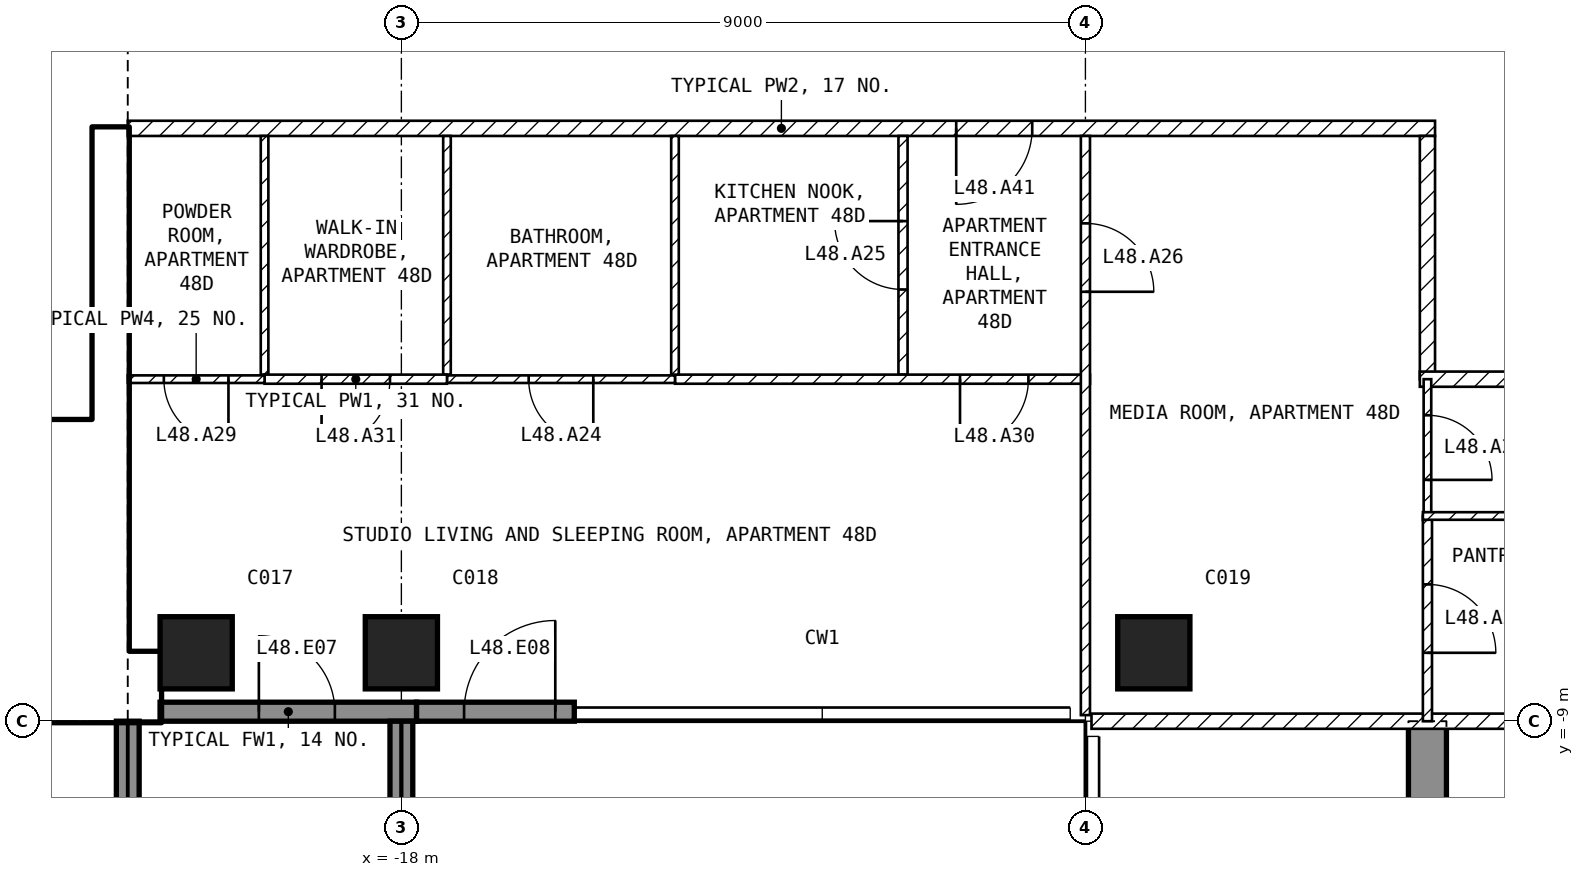
"""IFC4 building model, lengths in metres.
Left out: names, types, materials, properties, quantities, classifications, styles, units other than length and angle.
Written with IfcOpenShell. Run it as: python <this file> out.ifc"""

import sys

from ifc_helpers import new_model, si_unit, direction, frame, frame_2d, origin, origin_2d, place, context, subcontext, project, spatial, polyline, rectangle, outline, extrude, element, fill, save


model = new_model("IFC4")
c1 = context("Model", 3, precision=1e-05, world=origin(), true_north=direction((0.0, 1.0)))
c2 = subcontext(c1, "Body", "Model", "MODEL_VIEW")
j1 = project(units=[si_unit("LENGTHUNIT", "METRE"), si_unit("PLANEANGLEUNIT", "RADIAN")], contexts=[c1])
p1 = place(None, origin())
s1 = spatial("IfcSite", under=j1, at=p1, CompositionType="ELEMENT")
p2 = place(p1, origin())
s2 = spatial("IfcBuilding", under=s1, at=p2, CompositionType="ELEMENT")
p3 = place(p2, frame((0.0, 0.0, 194.6)))
s3 = spatial("IfcBuildingStorey", under=s2, at=p3, CompositionType="ELEMENT", Elevation=194.6)
for number, where, z_axis, x_axis in (
    (1, (-20.7, -8.1, -0.25), (0.0, 0.0, 1.0), (1.0, 0.0, 0.0)),
    (2, (-18.0, -8.1, -0.25), (0.0, 0.0, 1.0), (1.0, 0.0, 0.0)),
    (3, (-8.1, -8.1, -0.25), (0.0, 0.0, 1.0), (1.0, 0.0, 0.0)),
):
    element("IfcColumn", number, at=place(p3, frame(where, z_axis=z_axis, x_axis=x_axis)), inside=s3, PredefinedType="COLUMN", context=c2, shape_type="SweptSolid", body=[
        extrude(rectangle(XDim=0.95, YDim=0.95, at=origin_2d()), origin(), (0.0, 0.0, 1.0), 3.5),
    ])
p4 = place(p3, frame((-4.75, -20.225, -0.25), z_axis=(1.0, 0.0, 0.0), x_axis=(0.0, 1.0, 0.0)))
e4 = element("IfcWall", 4, at=p4, inside=s3, PredefinedType="SHEAR", context=c2, shape_type="SweptSolid", body=[
    extrude(outline(polyline([(0.0, 0.0), (6.725, 0.0), (6.725, 2.65), (9.125, 2.65), (9.125, 0.0), (11.225, 0.0), (11.225, 3.5), (0.0, 3.5), (0.0, 0.0)])), origin(), (0.0, 0.0, 1.0), 0.5),
])
p5 = place(p3, frame((-21.175, -8.875, 0.0), z_axis=(0.0, 0.0, 1.0), x_axis=(1.0, 0.0, 0.0)))
e5 = element("IfcWall", 5, at=p5, inside=s3, PredefinedType="SOLIDWALL", context=c2, shape_type="SweptSolid", body=[
    extrude(rectangle(XDim=3.375, YDim=0.25, at=frame_2d((1.688, 0.0))), origin(), (0.0, 0.0, 1.0), 3.25),
])
p6 = place(p5, frame((1.3, 0.0, 0.0)))
e6 = element("IfcOpeningElement", 6, at=p6, cuts=e5, PredefinedType="OPENING", context=c2, shape_type="SweptSolid", body=[
    extrude(rectangle(XDim=1.0, YDim=2.4, at=frame_2d((0.5, 1.2))), frame((0.0, 0.135, 0.0), z_axis=(0.0, -1.0, 0.0), x_axis=(1.0, 0.0, 0.0)), (0.0, 0.0, 1.0), 0.27),
])
p7 = place(p3, frame((-17.8, -8.875, 0.0), z_axis=(0.0, 0.0, 1.0), x_axis=(1.0, 0.0, 0.0)))
e7 = element("IfcWall", 7, at=p7, inside=s3, PredefinedType="SOLIDWALL", context=c2, shape_type="SweptSolid", body=[
    extrude(rectangle(XDim=2.075, YDim=0.25, at=frame_2d((1.038, 0.0))), origin(), (0.0, 0.0, 1.0), 3.25),
])
p8 = place(p7, frame((0.625, 0.0, 0.0)))
e8 = element("IfcOpeningElement", 8, at=p8, cuts=e7, PredefinedType="OPENING", context=c2, shape_type="SweptSolid", body=[
    extrude(rectangle(XDim=1.2, YDim=2.4, at=frame_2d((0.6, 1.2))), frame((0.0, 0.135, 0.0), z_axis=(0.0, -1.0, 0.0), x_axis=(1.0, 0.0, 0.0)), (0.0, 0.0, 1.0), 0.27),
])
for number, where, z_axis, x_axis in (
    (9, (-21.6, -9.0, 0.0), (0.0, 0.0, 1.0), (0.0, -1.0, 0.0)),
    (10, (-18.0, -9.0, 0.0), (0.0, 0.0, 1.0), (0.0, -1.0, 0.0)),
):
    element("IfcWall", number, at=place(p3, frame(where, z_axis=z_axis, x_axis=x_axis)), inside=s3, PredefinedType="SOLIDWALL", context=c2, shape_type="SweptSolid", body=[
        extrude(rectangle(XDim=2.7, YDim=0.3, at=frame_2d((1.35, 0.0))), origin(), (0.0, 0.0, 1.0), 3.25),
    ])
p9 = place(p3, frame((-30.2, -8.55, 0.0), z_axis=(0.0, 0.0, 1.0), x_axis=(1.0, 0.0, 0.0)))
e11 = element("IfcWall", 11, at=p9, inside=s3, PredefinedType="SHEAR", context=c2, shape_type="SweptSolid", body=[
    extrude(rectangle(XDim=9.025, YDim=0.9, at=frame_2d((4.512, 0.0))), origin(), (0.0, 0.0, 1.0), 3.25),
])
p10 = place(p3, frame((-21.825, -8.1, 0.0), z_axis=(0.0, 0.0, 1.0), x_axis=(0.0, 1.0, 0.0)))
e12 = element("IfcWall", 12, at=p10, inside=s3, PredefinedType="SHEAR", context=c2, shape_type="SweptSolid", body=[
    extrude(rectangle(XDim=6.9, YDim=0.45, at=frame_2d((3.45, 0.0))), origin(), (0.0, 0.0, 1.0), 3.25),
])
p11 = place(p3, frame((-28.35, -5.15, 0.0), z_axis=(0.0, 0.0, 1.0), x_axis=(1.0, 0.0, 0.0)))
e13 = element("IfcWall", 13, at=p11, inside=s3, PredefinedType="SOLIDWALL", context=c2, shape_type="SweptSolid", body=[
    extrude(rectangle(XDim=6.3, YDim=0.2, at=frame_2d((3.15, 0.0))), origin(), (0.0, 0.0, 1.0), 3.25),
])
p12 = place(p11, frame((5.1, 0.0, 0.0)))
e14 = element("IfcOpeningElement", 14, at=p12, cuts=e13, PredefinedType="OPENING", context=c2, shape_type="SweptSolid", body=[
    extrude(rectangle(XDim=1.0, YDim=2.1, at=frame_2d((0.5, 1.05))), frame((0.0, 0.11, 0.0), z_axis=(0.0, -1.0, 0.0), x_axis=(1.0, 0.0, 0.0)), (0.0, 0.0, 1.0), 0.22),
])
p13 = place(p3, frame((-4.4, -1.2, 0.0), z_axis=(0.0, 0.0, 1.0), x_axis=(-1.0, 0.0, 0.0)))
e15 = element("IfcWall", 15, at=p13, inside=s3, PredefinedType="PARTITIONING", context=c2, shape_type="SweptSolid", body=[
    extrude(rectangle(XDim=17.2, YDim=0.2, at=frame_2d((8.6, 0.0))), origin(), (0.0, 0.0, 1.0), 3.25),
])
p14 = place(p13, frame((5.3, 0.0, 0.0)))
e16 = element("IfcOpeningElement", 16, at=p14, cuts=e15, PredefinedType="OPENING", context=c2, shape_type="SweptSolid", body=[
    extrude(rectangle(XDim=1.0, YDim=2.1, at=frame_2d((0.5, 1.05))), frame((0.0, 0.11, 0.0), z_axis=(0.0, -1.0, 0.0), x_axis=(1.0, 0.0, 0.0)), (0.0, 0.0, 1.0), 0.22),
])
p15 = place(p3, frame((-4.5, -4.5, 0.0), z_axis=(0.0, 0.0, 1.0), x_axis=(0.0, 1.0, 0.0)))
e17 = element("IfcWall", 17, at=p15, inside=s3, PredefinedType="PARTITIONING", context=c2, shape_type="SweptSolid", body=[
    extrude(rectangle(XDim=3.2, YDim=0.2, at=frame_2d((1.6, 0.0))), origin(), (0.0, 0.0, 1.0), 3.25),
])
p16 = place(p3, frame((-1.1, -4.5, 0.0), z_axis=(0.0, 0.0, 1.0), x_axis=(-1.0, 0.0, 0.0)))
e18 = element("IfcWall", 18, at=p16, inside=s3, PredefinedType="PARTITIONING", context=c2, shape_type="SweptSolid", body=[
    extrude(rectangle(XDim=3.5, YDim=0.2, at=frame_2d((1.75, 0.0))), origin(), (0.0, 0.0, 1.0), 3.25),
])
p17 = place(p3, frame((8.92, -9.0, 0.0), z_axis=(0.0, 0.0, 1.0), x_axis=(-1.0, 0.0, 0.0)))
e19 = element("IfcWall", 19, at=p17, inside=s3, PredefinedType="PARTITIONING", context=c2, shape_type="SweptSolid", body=[
    extrude(rectangle(XDim=17.84, YDim=0.2, at=frame_2d((8.92, 0.0))), origin(), (0.0, 0.0, 1.0), 3.25),
])
p18 = place(p17, frame((8.42, 0.0, 0.0)))
e20 = element("IfcOpeningElement", 20, at=p18, cuts=e19, PredefinedType="OPENING", context=c2, shape_type="SweptSolid", body=[
    extrude(rectangle(XDim=1.0, YDim=2.1, at=frame_2d((0.5, 1.05))), frame((0.0, 0.11, 0.0), z_axis=(0.0, -1.0, 0.0), x_axis=(1.0, 0.0, 0.0)), (0.0, 0.0, 1.0), 0.22),
])
p19 = place(p3, frame((-11.4, -4.44, 0.0), z_axis=(0.0, 0.0, 1.0), x_axis=(0.0, 1.0, 0.0)))
e21 = element("IfcWall", 21, at=p19, inside=s3, PredefinedType="PARTITIONING", context=c2, shape_type="SweptSolid", body=[
    extrude(rectangle(XDim=3.14, YDim=0.12, at=frame_2d((1.57, 0.0))), origin(), (0.0, 0.0, 1.0), 3.25),
])
p20 = place(p19, frame((1.12, 0.0, 0.0)))
e22 = element("IfcOpeningElement", 22, at=p20, cuts=e21, PredefinedType="OPENING", context=c2, shape_type="SweptSolid", body=[
    extrude(rectangle(XDim=0.9, YDim=2.1, at=frame_2d((0.45, 1.05))), frame((0.0, 0.07, 0.0), z_axis=(0.0, -1.0, 0.0), x_axis=(1.0, 0.0, 0.0)), (0.0, 0.0, 1.0), 0.14),
])
p21 = place(p3, frame((-8.94, -4.5, 0.0), z_axis=(0.0, 0.0, 1.0), x_axis=(-1.0, 0.0, 0.0)))
e23 = element("IfcWall", 23, at=p21, inside=s3, PredefinedType="PARTITIONING", context=c2, shape_type="SweptSolid", body=[
    extrude(rectangle(XDim=5.46, YDim=0.12, at=frame_2d((2.73, 0.0))), origin(), (0.0, 0.0, 1.0), 3.25),
])
p22 = place(p21, frame((0.81, 0.0, 0.0)))
e24 = element("IfcOpeningElement", 24, at=p22, cuts=e23, PredefinedType="OPENING", context=c2, shape_type="SweptSolid", body=[
    extrude(rectangle(XDim=0.9, YDim=2.1, at=frame_2d((0.45, 1.05))), frame((0.0, 0.07, 0.0), z_axis=(0.0, -1.0, 0.0), x_axis=(1.0, 0.0, 0.0)), (0.0, 0.0, 1.0), 0.14),
])
p23 = place(p3, frame((-9.0, -1.3, 0.0), z_axis=(0.0, 0.0, 1.0), x_axis=(0.0, -1.0, 0.0)))
e25 = element("IfcWall", 25, at=p23, inside=s3, PredefinedType="PARTITIONING", context=c2, shape_type="SweptSolid", body=[
    extrude(rectangle(XDim=7.62, YDim=0.12, at=frame_2d((3.81, 0.0))), origin(), (0.0, 0.0, 1.0), 3.25),
])
p24 = place(p23, frame((1.15, 0.0, 0.0)))
e26 = element("IfcOpeningElement", 26, at=p24, cuts=e25, PredefinedType="OPENING", context=c2, shape_type="SweptSolid", body=[
    extrude(rectangle(XDim=0.9, YDim=2.1, at=frame_2d((0.45, 1.05))), frame((0.0, 0.07, 0.0), z_axis=(0.0, -1.0, 0.0), x_axis=(1.0, 0.0, 0.0)), (0.0, 0.0, 1.0), 0.14),
])
for number, where, z_axis, x_axis in (
    (27, (-14.4, -4.44, 0.0), (0.0, 0.0, 1.0), (0.0, 1.0, 0.0)),
    (28, (-17.4, -4.44, 0.0), (0.0, 0.0, 1.0), (0.0, 1.0, 0.0)),
):
    element("IfcWall", number, at=place(p3, frame(where, z_axis=z_axis, x_axis=x_axis)), inside=s3, PredefinedType="PARTITIONING", context=c2, shape_type="SweptSolid", body=[
        extrude(rectangle(XDim=3.14, YDim=0.1, at=frame_2d((1.57, 0.0))), origin(), (0.0, 0.0, 1.0), 3.25),
    ])
p25 = place(p3, frame((-14.4, -4.5, 0.0), z_axis=(0.0, 0.0, 1.0), x_axis=(-1.0, 0.0, 0.0)))
e29 = element("IfcWall", 29, at=p25, inside=s3, PredefinedType="PARTITIONING", context=c2, shape_type="SweptSolid", body=[
    extrude(rectangle(XDim=3.0, YDim=0.1, at=frame_2d((1.5, 0.0))), origin(), (0.0, 0.0, 1.0), 3.25),
])
p26 = place(p25, frame((1.075, 0.0, 0.0)))
e30 = element("IfcOpeningElement", 30, at=p26, cuts=e29, PredefinedType="OPENING", context=c2, shape_type="SweptSolid", body=[
    extrude(rectangle(XDim=0.85, YDim=2.1, at=frame_2d((0.425, 1.05))), frame((0.0, 0.06, 0.0), z_axis=(0.0, -1.0, 0.0), x_axis=(1.0, 0.0, 0.0)), (0.0, 0.0, 1.0), 0.12),
])
p27 = place(p3, frame((-19.8, -4.44, 0.0), z_axis=(0.0, 0.0, 1.0), x_axis=(0.0, 1.0, 0.0)))
e31 = element("IfcWall", 31, at=p27, inside=s3, PredefinedType="PARTITIONING", context=c2, shape_type="SweptSolid", body=[
    extrude(rectangle(XDim=3.14, YDim=0.1, at=frame_2d((1.57, 0.0))), origin(), (0.0, 0.0, 1.0), 3.25),
])
p28 = place(p3, frame((-17.4, -4.5, 0.0), z_axis=(0.0, 0.0, 1.0), x_axis=(-1.0, 0.0, 0.0)))
e32 = element("IfcWall", 32, at=p28, inside=s3, PredefinedType="PARTITIONING", context=c2, shape_type="SweptSolid", body=[
    extrude(rectangle(XDim=2.4, YDim=0.12, at=frame_2d((1.2, 0.0))), origin(), (0.0, 0.0, 1.0), 3.25),
])
p29 = place(p28, frame((0.75, 0.0, 0.0)))
e33 = element("IfcOpeningElement", 33, at=p29, cuts=e32, PredefinedType="OPENING", context=c2, shape_type="SweptSolid", body=[
    extrude(rectangle(XDim=0.9, YDim=2.1, at=frame_2d((0.45, 1.05))), frame((0.0, 0.07, 0.0), z_axis=(0.0, -1.0, 0.0), x_axis=(1.0, 0.0, 0.0)), (0.0, 0.0, 1.0), 0.14),
])
p30 = place(p3, frame((-19.8, -4.5, 0.0), z_axis=(0.0, 0.0, 1.0), x_axis=(-1.0, 0.0, 0.0)))
e34 = element("IfcWall", 34, at=p30, inside=s3, PredefinedType="PARTITIONING", context=c2, shape_type="SweptSolid", body=[
    extrude(rectangle(XDim=1.8, YDim=0.1, at=frame_2d((0.9, 0.0))), origin(), (0.0, 0.0, 1.0), 3.25),
])
p31 = place(p30, frame((0.475, 0.0, 0.0)))
e35 = element("IfcOpeningElement", 35, at=p31, cuts=e34, PredefinedType="OPENING", context=c2, shape_type="SweptSolid", body=[
    extrude(rectangle(XDim=0.85, YDim=2.1, at=frame_2d((0.425, 1.05))), frame((0.0, 0.06, 0.0), z_axis=(0.0, -1.0, 0.0), x_axis=(1.0, 0.0, 0.0)), (0.0, 0.0, 1.0), 0.12),
])
p32 = place(p3, frame((-4.5, -4.5, 0.0), z_axis=(0.0, 0.0, 1.0), x_axis=(0.0, -1.0, 0.0)))
e36 = element("IfcWall", 36, at=p32, inside=s3, PredefinedType="PARTITIONING", context=c2, shape_type="SweptSolid", body=[
    extrude(rectangle(XDim=1.8, YDim=0.1, at=frame_2d((0.9, 0.0))), origin(), (0.0, 0.0, 1.0), 3.25),
])
p33 = place(p32, frame((0.475, 0.0, 0.0)))
e37 = element("IfcOpeningElement", 37, at=p33, cuts=e36, PredefinedType="OPENING", context=c2, shape_type="SweptSolid", body=[
    extrude(rectangle(XDim=0.85, YDim=2.1, at=frame_2d((0.425, 1.05))), frame((0.0, 0.06, 0.0), z_axis=(0.0, -1.0, 0.0), x_axis=(1.0, 0.0, 0.0)), (0.0, 0.0, 1.0), 0.12),
])
p34 = place(p3, frame((-4.5, -6.3, 0.0), z_axis=(0.0, 0.0, 1.0), x_axis=(0.0, -1.0, 0.0)))
e38 = element("IfcWall", 38, at=p34, inside=s3, PredefinedType="PARTITIONING", context=c2, shape_type="SweptSolid", body=[
    extrude(rectangle(XDim=2.7, YDim=0.12, at=frame_2d((1.35, 0.0))), origin(), (0.0, 0.0, 1.0), 3.25),
])
p35 = place(p34, frame((0.9, 0.0, 0.0)))
e39 = element("IfcOpeningElement", 39, at=p35, cuts=e38, PredefinedType="OPENING", context=c2, shape_type="SweptSolid", body=[
    extrude(rectangle(XDim=0.9, YDim=2.1, at=frame_2d((0.45, 1.05))), frame((0.0, 0.07, 0.0), z_axis=(0.0, -1.0, 0.0), x_axis=(1.0, 0.0, 0.0)), (0.0, 0.0, 1.0), 0.14),
])
p36 = place(p3, frame((-1.1, -6.3, 0.0), z_axis=(0.0, 0.0, 1.0), x_axis=(-1.0, 0.0, 0.0)))
e40 = element("IfcWall", 40, at=p36, inside=s3, PredefinedType="PARTITIONING", context=c2, shape_type="SweptSolid", body=[
    extrude(rectangle(XDim=3.46, YDim=0.1, at=frame_2d((1.73, 0.0))), origin(), (0.0, 0.0, 1.0), 3.25),
])
p37 = place(p6, origin())
e41 = element("IfcDoor", 41, at=p37, inside=s3, OperationType="SINGLE_SWING_LEFT", PredefinedType="DOOR", context=c2, shape_type="SweptSolid", body=[
    extrude(rectangle(XDim=1.0, YDim=2.4, at=frame_2d((0.5, 1.2))), frame((0.0, 0.025, 0.0), z_axis=(0.0, -1.0, 0.0), x_axis=(1.0, 0.0, 0.0)), (0.0, 0.0, 1.0), 0.05),
])
fill(e6, e41)
p38 = place(p8, origin())
e42 = element("IfcDoor", 42, at=p38, inside=s3, OperationType="SINGLE_SWING_RIGHT", PredefinedType="DOOR", context=c2, shape_type="SweptSolid", body=[
    extrude(rectangle(XDim=1.2, YDim=2.4, at=frame_2d((0.6, 1.2))), frame((0.0, 0.025, 0.0), z_axis=(0.0, -1.0, 0.0), x_axis=(1.0, 0.0, 0.0)), (0.0, 0.0, 1.0), 0.05),
])
fill(e8, e42)
p39 = place(p12, origin())
e43 = element("IfcDoor", 43, at=p39, inside=s3, OperationType="SINGLE_SWING_LEFT", PredefinedType="DOOR", context=c2, shape_type="SweptSolid", body=[
    extrude(rectangle(XDim=1.0, YDim=2.1, at=frame_2d((0.5, 1.05))), frame((0.0, 0.025, 0.0), z_axis=(0.0, -1.0, 0.0), x_axis=(1.0, 0.0, 0.0)), (0.0, 0.0, 1.0), 0.05),
])
fill(e14, e43)
p40 = place(p26, origin())
e44 = element("IfcDoor", 44, at=p40, inside=s3, OperationType="SINGLE_SWING_LEFT", PredefinedType="DOOR", context=c2, shape_type="SweptSolid", body=[
    extrude(rectangle(XDim=0.85, YDim=2.1, at=frame_2d((0.425, 1.05))), frame((0.0, 0.025, 0.0), z_axis=(0.0, -1.0, 0.0), x_axis=(1.0, 0.0, 0.0)), (0.0, 0.0, 1.0), 0.05),
])
fill(e30, e44)
p41 = place(p20, origin())
e45 = element("IfcDoor", 45, at=p41, inside=s3, OperationType="SINGLE_SWING_RIGHT", PredefinedType="DOOR", context=c2, shape_type="SweptSolid", body=[
    extrude(rectangle(XDim=0.9, YDim=2.1, at=frame_2d((0.45, 1.05))), frame((0.0, 0.025, 0.0), z_axis=(0.0, -1.0, 0.0), x_axis=(1.0, 0.0, 0.0)), (0.0, 0.0, 1.0), 0.05),
])
fill(e22, e45)
p42 = place(p24, origin())
e46 = element("IfcDoor", 46, at=p42, inside=s3, OperationType="SINGLE_SWING_RIGHT", PredefinedType="DOOR", context=c2, shape_type="SweptSolid", body=[
    extrude(rectangle(XDim=0.9, YDim=2.1, at=frame_2d((0.45, 1.05))), frame((0.0, 0.025, 0.0), z_axis=(0.0, -1.0, 0.0), x_axis=(1.0, 0.0, 0.0)), (0.0, 0.0, 1.0), 0.05),
])
fill(e26, e46)
p43 = place(p35, origin())
e47 = element("IfcDoor", 47, at=p43, inside=s3, OperationType="SINGLE_SWING_RIGHT", PredefinedType="DOOR", context=c2, shape_type="SweptSolid", body=[
    extrude(rectangle(XDim=0.9, YDim=2.1, at=frame_2d((0.45, 1.05))), frame((0.0, 0.025, 0.0), z_axis=(0.0, -1.0, 0.0), x_axis=(1.0, 0.0, 0.0)), (0.0, 0.0, 1.0), 0.05),
])
fill(e39, e47)
p44 = place(p33, origin())
e48 = element("IfcDoor", 48, at=p44, inside=s3, OperationType="SINGLE_SWING_RIGHT", PredefinedType="DOOR", context=c2, shape_type="SweptSolid", body=[
    extrude(rectangle(XDim=0.85, YDim=2.1, at=frame_2d((0.425, 1.05))), frame((0.0, 0.025, 0.0), z_axis=(0.0, -1.0, 0.0), x_axis=(1.0, 0.0, 0.0)), (0.0, 0.0, 1.0), 0.05),
])
fill(e37, e48)
p45 = place(p31, origin())
e49 = element("IfcDoor", 49, at=p45, inside=s3, OperationType="SINGLE_SWING_LEFT", PredefinedType="DOOR", context=c2, shape_type="SweptSolid", body=[
    extrude(rectangle(XDim=0.85, YDim=2.1, at=frame_2d((0.425, 1.05))), frame((0.0, 0.025, 0.0), z_axis=(0.0, -1.0, 0.0), x_axis=(1.0, 0.0, 0.0)), (0.0, 0.0, 1.0), 0.05),
])
fill(e35, e49)
p46 = place(p22, origin())
e50 = element("IfcDoor", 50, at=p46, inside=s3, OperationType="SINGLE_SWING_RIGHT", PredefinedType="DOOR", context=c2, shape_type="SweptSolid", body=[
    extrude(rectangle(XDim=0.9, YDim=2.1, at=frame_2d((0.45, 1.05))), frame((0.0, 0.025, 0.0), z_axis=(0.0, -1.0, 0.0), x_axis=(1.0, 0.0, 0.0)), (0.0, 0.0, 1.0), 0.05),
])
fill(e24, e50)
p47 = place(p29, origin())
e51 = element("IfcDoor", 51, at=p47, inside=s3, OperationType="SINGLE_SWING_RIGHT", PredefinedType="DOOR", context=c2, shape_type="SweptSolid", body=[
    extrude(rectangle(XDim=0.9, YDim=2.1, at=frame_2d((0.45, 1.05))), frame((0.0, 0.025, 0.0), z_axis=(0.0, -1.0, 0.0), x_axis=(1.0, 0.0, 0.0)), (0.0, 0.0, 1.0), 0.05),
])
fill(e33, e51)
p48 = place(p14, origin())
e52 = element("IfcDoor", 52, at=p48, inside=s3, OperationType="SINGLE_SWING_RIGHT", PredefinedType="DOOR", context=c2, shape_type="SweptSolid", body=[
    extrude(rectangle(XDim=1.0, YDim=2.1, at=frame_2d((0.5, 1.05))), frame((0.0, 0.025, 0.0), z_axis=(0.0, -1.0, 0.0), x_axis=(1.0, 0.0, 0.0)), (0.0, 0.0, 1.0), 0.05),
])
fill(e16, e52)
save(model, sys.argv[1])
